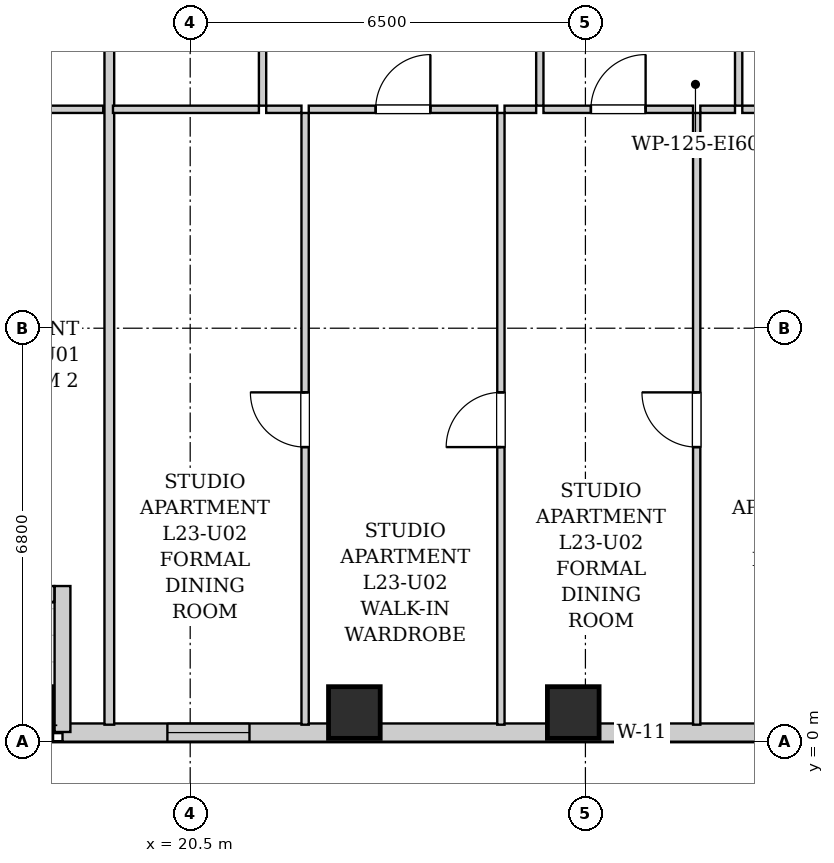
"""IFC4 building model, lengths in metres.
Left out: names, types, materials, properties, quantities, classifications, styles, units other than length and angle.
Written with IfcOpenShell. Run it as: python <this file> out.ifc"""

import sys

from ifc_helpers import new_model, si_unit, direction, frame, frame_2d, origin, origin_2d, place, context, subcontext, project, spatial, rectangle, extrude, element, fill, save


model = new_model("IFC4")
c1 = context("Model", 3, precision=1e-05, world=origin(), true_north=direction((0.0, 1.0)))
c2 = subcontext(c1, "Body", "Model", "MODEL_VIEW")
j1 = project(units=[si_unit("LENGTHUNIT", "METRE"), si_unit("PLANEANGLEUNIT", "RADIAN")], contexts=[c1])
p1 = place(None, origin())
s1 = spatial("IfcSite", under=j1, at=p1, CompositionType="ELEMENT")
p2 = place(p1, origin())
s2 = spatial("IfcBuilding", under=s1, at=p2, CompositionType="ELEMENT")
p3 = place(p2, frame((0.0, 0.0, 84.7)))
s3 = spatial("IfcBuildingStorey", under=s2, at=p3, CompositionType="ELEMENT", Elevation=84.7)
for number, where, z_axis, x_axis in (
    (1, (23.2, 0.48, 0.0), (0.0, 0.0, 1.0), (1.0, 0.0, 0.0)),
    (2, (26.8, 0.48, 0.0), (0.0, 0.0, 1.0), (1.0, 0.0, 0.0)),
):
    element("IfcColumn", number, at=place(p3, frame(where, z_axis=z_axis, x_axis=x_axis)), inside=s3, PredefinedType="COLUMN", context=c2, shape_type="SweptSolid", body=[
        extrude(rectangle(XDim=0.85, YDim=0.85, at=origin_2d()), origin(), (0.0, 0.0, 1.0), 3.2),
    ])
p4 = place(p3, frame((40.9, 0.15, 0.0), z_axis=(0.0, 0.0, 1.0), x_axis=(-1.0, 0.0, 0.0)))
e3 = element("IfcWall", 3, at=p4, inside=s3, PredefinedType="SOLIDWALL", context=c2, shape_type="SweptSolid", body=[
    extrude(rectangle(XDim=22.5, YDim=0.3, at=frame_2d((11.25, 0.0))), origin(), (0.0, 0.0, 1.0), 2.94),
])
p5 = place(p4, frame((19.425, 0.0, 0.55)))
e4 = element("IfcOpeningElement", 4, at=p5, cuts=e3, PredefinedType="OPENING", context=c2, shape_type="SweptSolid", body=[
    extrude(rectangle(XDim=1.35, YDim=1.2, at=frame_2d((0.675, 0.6))), frame((0.0, 0.16, 0.0), z_axis=(0.0, -1.0, 0.0), x_axis=(1.0, 0.0, 0.0)), (0.0, 0.0, 1.0), 0.32),
])
p6 = place(p4, frame((12.55, 0.0, 0.55)))
e5 = element("IfcOpeningElement", 5, at=p6, cuts=e3, PredefinedType="OPENING", context=c2, shape_type="SweptSolid", body=[
    extrude(rectangle(XDim=0.85, YDim=1.2, at=frame_2d((0.425, 0.6))), frame((0.0, 0.16, 0.0), z_axis=(0.0, -1.0, 0.0), x_axis=(1.0, 0.0, 0.0)), (0.0, 0.0, 1.0), 0.32),
])
p7 = place(p4, frame((9.75, 0.0, 0.55)))
e6 = element("IfcOpeningElement", 6, at=p7, cuts=e3, PredefinedType="OPENING", context=c2, shape_type="SweptSolid", body=[
    extrude(rectangle(XDim=1.35, YDim=1.2, at=frame_2d((0.675, 0.6))), frame((0.0, 0.16, 0.0), z_axis=(0.0, -1.0, 0.0), x_axis=(1.0, 0.0, 0.0)), (0.0, 0.0, 1.0), 0.32),
])
p8 = place(p4, frame((6.265, 0.0, 0.55)))
e7 = element("IfcOpeningElement", 7, at=p8, cuts=e3, PredefinedType="OPENING", context=c2, shape_type="SweptSolid", body=[
    extrude(rectangle(XDim=0.85, YDim=1.2, at=frame_2d((0.425, 0.6))), frame((0.0, 0.16, 0.0), z_axis=(0.0, -1.0, 0.0), x_axis=(1.0, 0.0, 0.0)), (0.0, 0.0, 1.0), 0.32),
])
p9 = place(p4, frame((2.325, 0.0, 0.55)))
e8 = element("IfcOpeningElement", 8, at=p9, cuts=e3, PredefinedType="OPENING", context=c2, shape_type="SweptSolid", body=[
    extrude(rectangle(XDim=1.35, YDim=1.2, at=frame_2d((0.675, 0.6))), frame((0.0, 0.16, 0.0), z_axis=(0.0, -1.0, 0.0), x_axis=(1.0, 0.0, 0.0)), (0.0, 0.0, 1.0), 0.32),
])
p10 = place(p3, frame((18.4, 0.16, 0.0), z_axis=(0.0, 0.0, 1.0), x_axis=(0.0, 1.0, 0.0)))
e9 = element("IfcWall", 9, at=p10, inside=s3, PredefinedType="SOLIDWALL", context=c2, shape_type="SweptSolid", body=[
    extrude(rectangle(XDim=2.4, YDim=0.26, at=frame_2d((1.2, 0.0))), origin(), (0.0, 0.0, 1.0), 2.94),
])
p11 = place(p3, frame((18.266, 2.43, 0.0), z_axis=(0.0, 0.0, 1.0), x_axis=(-1.0, 0.0, 0.0)))
e10 = element("IfcWall", 10, at=p11, inside=s3, PredefinedType="SOLIDWALL", context=c2, shape_type="SweptSolid", body=[
    extrude(rectangle(XDim=4.882, YDim=0.26, at=frame_2d((2.441, 0.0))), origin(), (0.0, 0.0, 1.0), 2.94),
])
p12 = place(p11, frame((2.316, 0.0, 0.0)))
e11 = element("IfcOpeningElement", 11, at=p12, cuts=e10, PredefinedType="OPENING", context=c2, shape_type="SweptSolid", body=[
    extrude(rectangle(XDim=1.1, YDim=2.0, at=frame_2d((0.55, 1.0))), frame((0.0, 0.14, 0.0), z_axis=(0.0, -1.0, 0.0), x_axis=(1.0, 0.0, 0.0)), (0.0, 0.0, 1.0), 0.28),
])
p13 = place(p11, frame((3.576, 0.0, 0.55)))
e12 = element("IfcOpeningElement", 12, at=p13, cuts=e10, PredefinedType="OPENING", context=c2, shape_type="SweptSolid", body=[
    extrude(rectangle(XDim=0.85, YDim=1.2, at=frame_2d((0.425, 0.6))), frame((0.0, 0.14, 0.0), z_axis=(0.0, -1.0, 0.0), x_axis=(1.0, 0.0, 0.0)), (0.0, 0.0, 1.0), 0.28),
])
p14 = place(p11, frame((0.545, 0.0, 0.55)))
e13 = element("IfcOpeningElement", 13, at=p14, cuts=e10, PredefinedType="OPENING", context=c2, shape_type="SweptSolid", body=[
    extrude(rectangle(XDim=1.35, YDim=1.2, at=frame_2d((0.675, 0.6))), frame((0.0, 0.14, 0.0), z_axis=(0.0, -1.0, 0.0), x_axis=(1.0, 0.0, 0.0)), (0.0, 0.0, 1.0), 0.28),
])
p15 = place(p3, frame((16.17, 10.4, 0.0), z_axis=(0.0, 0.0, 1.0), x_axis=(1.0, 0.0, 0.0)))
e14 = element("IfcWall", 14, at=p15, inside=s3, PredefinedType="PARTITIONING", context=c2, shape_type="SweptSolid", body=[
    extrude(rectangle(XDim=2.9, YDim=0.12, at=frame_2d((1.45, 0.0))), origin(), (0.0, 0.0, 1.0), 2.94),
])
p16 = place(p15, frame((1.0, 0.0, 0.0)))
e15 = element("IfcOpeningElement", 15, at=p16, cuts=e14, PredefinedType="OPENING", context=c2, shape_type="SweptSolid", body=[
    extrude(rectangle(XDim=0.9, YDim=2.05, at=frame_2d((0.45, 1.025))), frame((0.0, 0.07, 0.0), z_axis=(0.0, -1.0, 0.0), x_axis=(1.0, 0.0, 0.0)), (0.0, 0.0, 1.0), 0.14),
])
p17 = place(p3, frame((19.17, 0.28, 0.0), z_axis=(0.0, 0.0, 1.0), x_axis=(0.0, 1.0, 0.0)))
e16 = element("IfcWall", 16, at=p17, inside=s3, PredefinedType="PARTITIONING", context=c2, shape_type="SweptSolid", body=[
    extrude(rectangle(XDim=13.03, YDim=0.16, at=frame_2d((6.515, 0.0))), origin(), (0.0, 0.0, 1.0), 2.94),
])
p18 = place(p3, frame((21.69, 10.46, 0.0), z_axis=(0.0, 0.0, 1.0), x_axis=(0.0, 1.0, 0.0)))
e17 = element("IfcWall", 17, at=p18, inside=s3, PredefinedType="PARTITIONING", context=c2, shape_type="SweptSolid", body=[
    extrude(rectangle(XDim=2.85, YDim=0.12, at=frame_2d((1.425, 0.0))), origin(), (0.0, 0.0, 1.0), 2.94),
])
p19 = place(p18, frame((0.995, 0.0, 0.0)))
e18 = element("IfcOpeningElement", 18, at=p19, cuts=e17, PredefinedType="OPENING", context=c2, shape_type="SweptSolid", body=[
    extrude(rectangle(XDim=0.86, YDim=2.05, at=frame_2d((0.43, 1.025))), frame((0.0, 0.07, 0.0), z_axis=(0.0, -1.0, 0.0), x_axis=(1.0, 0.0, 0.0)), (0.0, 0.0, 1.0), 0.14),
])
p20 = place(p3, frame((19.23, 10.4, 0.0), z_axis=(0.0, 0.0, 1.0), x_axis=(1.0, 0.0, 0.0)))
e19 = element("IfcWall", 19, at=p20, inside=s3, PredefinedType="PARTITIONING", context=c2, shape_type="SweptSolid", body=[
    extrude(rectangle(XDim=2.4, YDim=0.12, at=frame_2d((1.2, 0.0))), origin(), (0.0, 0.0, 1.0), 2.94),
])
p21 = place(p3, frame((26.25, 10.46, 0.0), z_axis=(0.0, 0.0, 1.0), x_axis=(0.0, 1.0, 0.0)))
e20 = element("IfcWall", 20, at=p21, inside=s3, PredefinedType="PARTITIONING", context=c2, shape_type="SweptSolid", body=[
    extrude(rectangle(XDim=2.85, YDim=0.12, at=frame_2d((1.425, 0.0))), origin(), (0.0, 0.0, 1.0), 2.94),
])
p22 = place(p21, frame((0.975, 0.0, 0.0)))
e21 = element("IfcOpeningElement", 21, at=p22, cuts=e20, PredefinedType="OPENING", context=c2, shape_type="SweptSolid", body=[
    extrude(rectangle(XDim=0.9, YDim=2.05, at=frame_2d((0.45, 1.025))), frame((0.0, 0.07, 0.0), z_axis=(0.0, -1.0, 0.0), x_axis=(1.0, 0.0, 0.0)), (0.0, 0.0, 1.0), 0.14),
])
p23 = place(p3, frame((21.75, 10.4, 0.0), z_axis=(0.0, 0.0, 1.0), x_axis=(1.0, 0.0, 0.0)))
e22 = element("IfcWall", 22, at=p23, inside=s3, PredefinedType="PARTITIONING", context=c2, shape_type="SweptSolid", body=[
    extrude(rectangle(XDim=0.58, YDim=0.12, at=frame_2d((0.29, 0.0))), origin(), (0.0, 0.0, 1.0), 2.94),
])
p24 = place(p3, frame((22.45, 10.4, 0.0), z_axis=(0.0, 0.0, 1.0), x_axis=(1.0, 0.0, 0.0)))
e23 = element("IfcWall", 23, at=p24, inside=s3, PredefinedType="PARTITIONING", context=c2, shape_type="SweptSolid", body=[
    extrude(rectangle(XDim=3.1, YDim=0.12, at=frame_2d((1.55, 0.0))), origin(), (0.0, 0.0, 1.0), 2.94),
])
p25 = place(p24, frame((1.1, 0.0, 0.0)))
e24 = element("IfcOpeningElement", 24, at=p25, cuts=e23, PredefinedType="OPENING", context=c2, shape_type="SweptSolid", body=[
    extrude(rectangle(XDim=0.9, YDim=2.05, at=frame_2d((0.45, 1.025))), frame((0.0, 0.07, 0.0), z_axis=(0.0, -1.0, 0.0), x_axis=(1.0, 0.0, 0.0)), (0.0, 0.0, 1.0), 0.14),
])
p26 = place(p3, frame((25.67, 10.4, 0.0), z_axis=(0.0, 0.0, 1.0), x_axis=(1.0, 0.0, 0.0)))
e25 = element("IfcWall", 25, at=p26, inside=s3, PredefinedType="PARTITIONING", context=c2, shape_type="SweptSolid", body=[
    extrude(rectangle(XDim=0.52, YDim=0.12, at=frame_2d((0.26, 0.0))), origin(), (0.0, 0.0, 1.0), 2.94),
])
p27 = place(p3, frame((29.52, 10.46, 0.0), z_axis=(0.0, 0.0, 1.0), x_axis=(0.0, 1.0, 0.0)))
e26 = element("IfcWall", 26, at=p27, inside=s3, PredefinedType="PARTITIONING", context=c2, shape_type="SweptSolid", body=[
    extrude(rectangle(XDim=2.85, YDim=0.12, at=frame_2d((1.425, 0.0))), origin(), (0.0, 0.0, 1.0), 2.94),
])
p28 = place(p27, frame((0.975, 0.0, 0.0)))
e27 = element("IfcOpeningElement", 27, at=p28, cuts=e26, PredefinedType="OPENING", context=c2, shape_type="SweptSolid", body=[
    extrude(rectangle(XDim=0.9, YDim=2.05, at=frame_2d((0.45, 1.025))), frame((0.0, 0.07, 0.0), z_axis=(0.0, -1.0, 0.0), x_axis=(1.0, 0.0, 0.0)), (0.0, 0.0, 1.0), 0.14),
])
p29 = place(p3, frame((26.31, 10.4, 0.0), z_axis=(0.0, 0.0, 1.0), x_axis=(1.0, 0.0, 0.0)))
e28 = element("IfcWall", 28, at=p29, inside=s3, PredefinedType="PARTITIONING", context=c2, shape_type="SweptSolid", body=[
    extrude(rectangle(XDim=2.46, YDim=0.12, at=frame_2d((1.23, 0.0))), origin(), (0.0, 0.0, 1.0), 2.94),
])
p30 = place(p29, frame((0.78, 0.0, 0.0)))
e29 = element("IfcOpeningElement", 29, at=p30, cuts=e28, PredefinedType="OPENING", context=c2, shape_type="SweptSolid", body=[
    extrude(rectangle(XDim=0.9, YDim=2.05, at=frame_2d((0.45, 1.025))), frame((0.0, 0.07, 0.0), z_axis=(0.0, -1.0, 0.0), x_axis=(1.0, 0.0, 0.0)), (0.0, 0.0, 1.0), 0.14),
])
p31 = place(p3, frame((28.89, 10.4, 0.0), z_axis=(0.0, 0.0, 1.0), x_axis=(1.0, 0.0, 0.0)))
e30 = element("IfcWall", 30, at=p31, inside=s3, PredefinedType="PARTITIONING", context=c2, shape_type="SweptSolid", body=[
    extrude(rectangle(XDim=0.57, YDim=0.12, at=frame_2d((0.285, 0.0))), origin(), (0.0, 0.0, 1.0), 2.94),
])
p32 = place(p3, frame((29.58, 10.4, 0.0), z_axis=(0.0, 0.0, 1.0), x_axis=(1.0, 0.0, 0.0)))
e31 = element("IfcWall", 31, at=p32, inside=s3, PredefinedType="PARTITIONING", context=c2, shape_type="SweptSolid", body=[
    extrude(rectangle(XDim=2.41, YDim=0.12, at=frame_2d((1.205, 0.0))), origin(), (0.0, 0.0, 1.0), 2.94),
])
p33 = place(p32, frame((0.755, 0.0, 0.0)))
e32 = element("IfcOpeningElement", 32, at=p33, cuts=e31, PredefinedType="OPENING", context=c2, shape_type="SweptSolid", body=[
    extrude(rectangle(XDim=0.9, YDim=2.05, at=frame_2d((0.45, 1.025))), frame((0.0, 0.07, 0.0), z_axis=(0.0, -1.0, 0.0), x_axis=(1.0, 0.0, 0.0)), (0.0, 0.0, 1.0), 0.14),
])
p34 = place(p3, frame((22.39, 0.28, 0.0), z_axis=(0.0, 0.0, 1.0), x_axis=(0.0, 1.0, 0.0)))
e33 = element("IfcWall", 33, at=p34, inside=s3, PredefinedType="PARTITIONING", context=c2, shape_type="SweptSolid", body=[
    extrude(rectangle(XDim=10.06, YDim=0.12, at=frame_2d((5.03, 0.0))), origin(), (0.0, 0.0, 1.0), 2.94),
])
p35 = place(p34, frame((4.565, 0.0, 0.0)))
e34 = element("IfcOpeningElement", 34, at=p35, cuts=e33, PredefinedType="OPENING", context=c2, shape_type="SweptSolid", body=[
    extrude(rectangle(XDim=0.9, YDim=2.05, at=frame_2d((0.45, 1.025))), frame((0.0, 0.07, 0.0), z_axis=(0.0, -1.0, 0.0), x_axis=(1.0, 0.0, 0.0)), (0.0, 0.0, 1.0), 0.14),
])
p36 = place(p3, frame((25.61, 0.28, 0.0), z_axis=(0.0, 0.0, 1.0), x_axis=(0.0, 1.0, 0.0)))
e35 = element("IfcWall", 35, at=p36, inside=s3, PredefinedType="PARTITIONING", context=c2, shape_type="SweptSolid", body=[
    extrude(rectangle(XDim=10.06, YDim=0.12, at=frame_2d((5.03, 0.0))), origin(), (0.0, 0.0, 1.0), 2.94),
])
p37 = place(p36, frame((4.565, 0.0, 0.0)))
e36 = element("IfcOpeningElement", 36, at=p37, cuts=e35, PredefinedType="OPENING", context=c2, shape_type="SweptSolid", body=[
    extrude(rectangle(XDim=0.9, YDim=2.05, at=frame_2d((0.45, 1.025))), frame((0.0, 0.07, 0.0), z_axis=(0.0, -1.0, 0.0), x_axis=(1.0, 0.0, 0.0)), (0.0, 0.0, 1.0), 0.14),
])
p38 = place(p3, frame((28.83, 0.28, 0.0), z_axis=(0.0, 0.0, 1.0), x_axis=(0.0, 1.0, 0.0)))
e37 = element("IfcWall", 37, at=p38, inside=s3, PredefinedType="PARTITIONING", context=c2, shape_type="SweptSolid", body=[
    extrude(rectangle(XDim=10.06, YDim=0.12, at=frame_2d((5.03, 0.0))), origin(), (0.0, 0.0, 1.0), 2.94),
])
p39 = place(p38, frame((4.565, 0.0, 0.0)))
e38 = element("IfcOpeningElement", 38, at=p39, cuts=e37, PredefinedType="OPENING", context=c2, shape_type="SweptSolid", body=[
    extrude(rectangle(XDim=0.9, YDim=2.05, at=frame_2d((0.45, 1.025))), frame((0.0, 0.07, 0.0), z_axis=(0.0, -1.0, 0.0), x_axis=(1.0, 0.0, 0.0)), (0.0, 0.0, 1.0), 0.14),
])
p40 = place(p25, origin())
e39 = element("IfcDoor", 39, at=p40, inside=s3, OperationType="SINGLE_SWING_RIGHT", PredefinedType="DOOR", context=c2, shape_type="SweptSolid", body=[
    extrude(rectangle(XDim=0.9, YDim=2.05, at=frame_2d((0.45, 1.025))), frame((0.0, 0.025, 0.0), z_axis=(0.0, -1.0, 0.0), x_axis=(1.0, 0.0, 0.0)), (0.0, 0.0, 1.0), 0.05),
])
fill(e24, e39)
p41 = place(p30, origin())
e40 = element("IfcDoor", 40, at=p41, inside=s3, OperationType="SINGLE_SWING_RIGHT", PredefinedType="DOOR", context=c2, shape_type="SweptSolid", body=[
    extrude(rectangle(XDim=0.9, YDim=2.05, at=frame_2d((0.45, 1.025))), frame((0.0, 0.025, 0.0), z_axis=(0.0, -1.0, 0.0), x_axis=(1.0, 0.0, 0.0)), (0.0, 0.0, 1.0), 0.05),
])
fill(e29, e40)
p42 = place(p35, origin())
e41 = element("IfcDoor", 41, at=p42, inside=s3, OperationType="SINGLE_SWING_RIGHT", PredefinedType="DOOR", context=c2, shape_type="SweptSolid", body=[
    extrude(rectangle(XDim=0.9, YDim=2.05, at=frame_2d((0.45, 1.025))), frame((0.0, 0.025, 0.0), z_axis=(0.0, -1.0, 0.0), x_axis=(1.0, 0.0, 0.0)), (0.0, 0.0, 1.0), 0.05),
])
fill(e34, e41)
p43 = place(p37, origin())
e42 = element("IfcDoor", 42, at=p43, inside=s3, OperationType="SINGLE_SWING_LEFT", PredefinedType="DOOR", context=c2, shape_type="SweptSolid", body=[
    extrude(rectangle(XDim=0.9, YDim=2.05, at=frame_2d((0.45, 1.025))), frame((0.0, 0.025, 0.0), z_axis=(0.0, -1.0, 0.0), x_axis=(1.0, 0.0, 0.0)), (0.0, 0.0, 1.0), 0.05),
])
fill(e36, e42)
p44 = place(p39, origin())
e43 = element("IfcDoor", 43, at=p44, inside=s3, OperationType="SINGLE_SWING_RIGHT", PredefinedType="DOOR", context=c2, shape_type="SweptSolid", body=[
    extrude(rectangle(XDim=0.9, YDim=2.05, at=frame_2d((0.45, 1.025))), frame((0.0, 0.025, 0.0), z_axis=(0.0, -1.0, 0.0), x_axis=(1.0, 0.0, 0.0)), (0.0, 0.0, 1.0), 0.05),
])
fill(e38, e43)
p45 = place(p5, origin())
e44 = element("IfcWindow", 44, at=p45, inside=s3, PartitioningType="SINGLE_PANEL", PredefinedType="WINDOW", context=c2, shape_type="SweptSolid", body=[
    extrude(rectangle(XDim=1.35, YDim=1.2, at=frame_2d((0.675, 0.6))), frame((0.0, 0.03, 0.0), z_axis=(0.0, -1.0, 0.0), x_axis=(1.0, 0.0, 0.0)), (0.0, 0.0, 1.0), 0.06),
])
fill(e4, e44)
p46 = place(p6, origin())
e45 = element("IfcWindow", 45, at=p46, inside=s3, PartitioningType="SINGLE_PANEL", PredefinedType="WINDOW", context=c2, shape_type="SweptSolid", body=[
    extrude(rectangle(XDim=0.85, YDim=1.2, at=frame_2d((0.425, 0.6))), frame((0.0, 0.03, 0.0), z_axis=(0.0, -1.0, 0.0), x_axis=(1.0, 0.0, 0.0)), (0.0, 0.0, 1.0), 0.06),
])
fill(e5, e45)
save(model, sys.argv[1])
